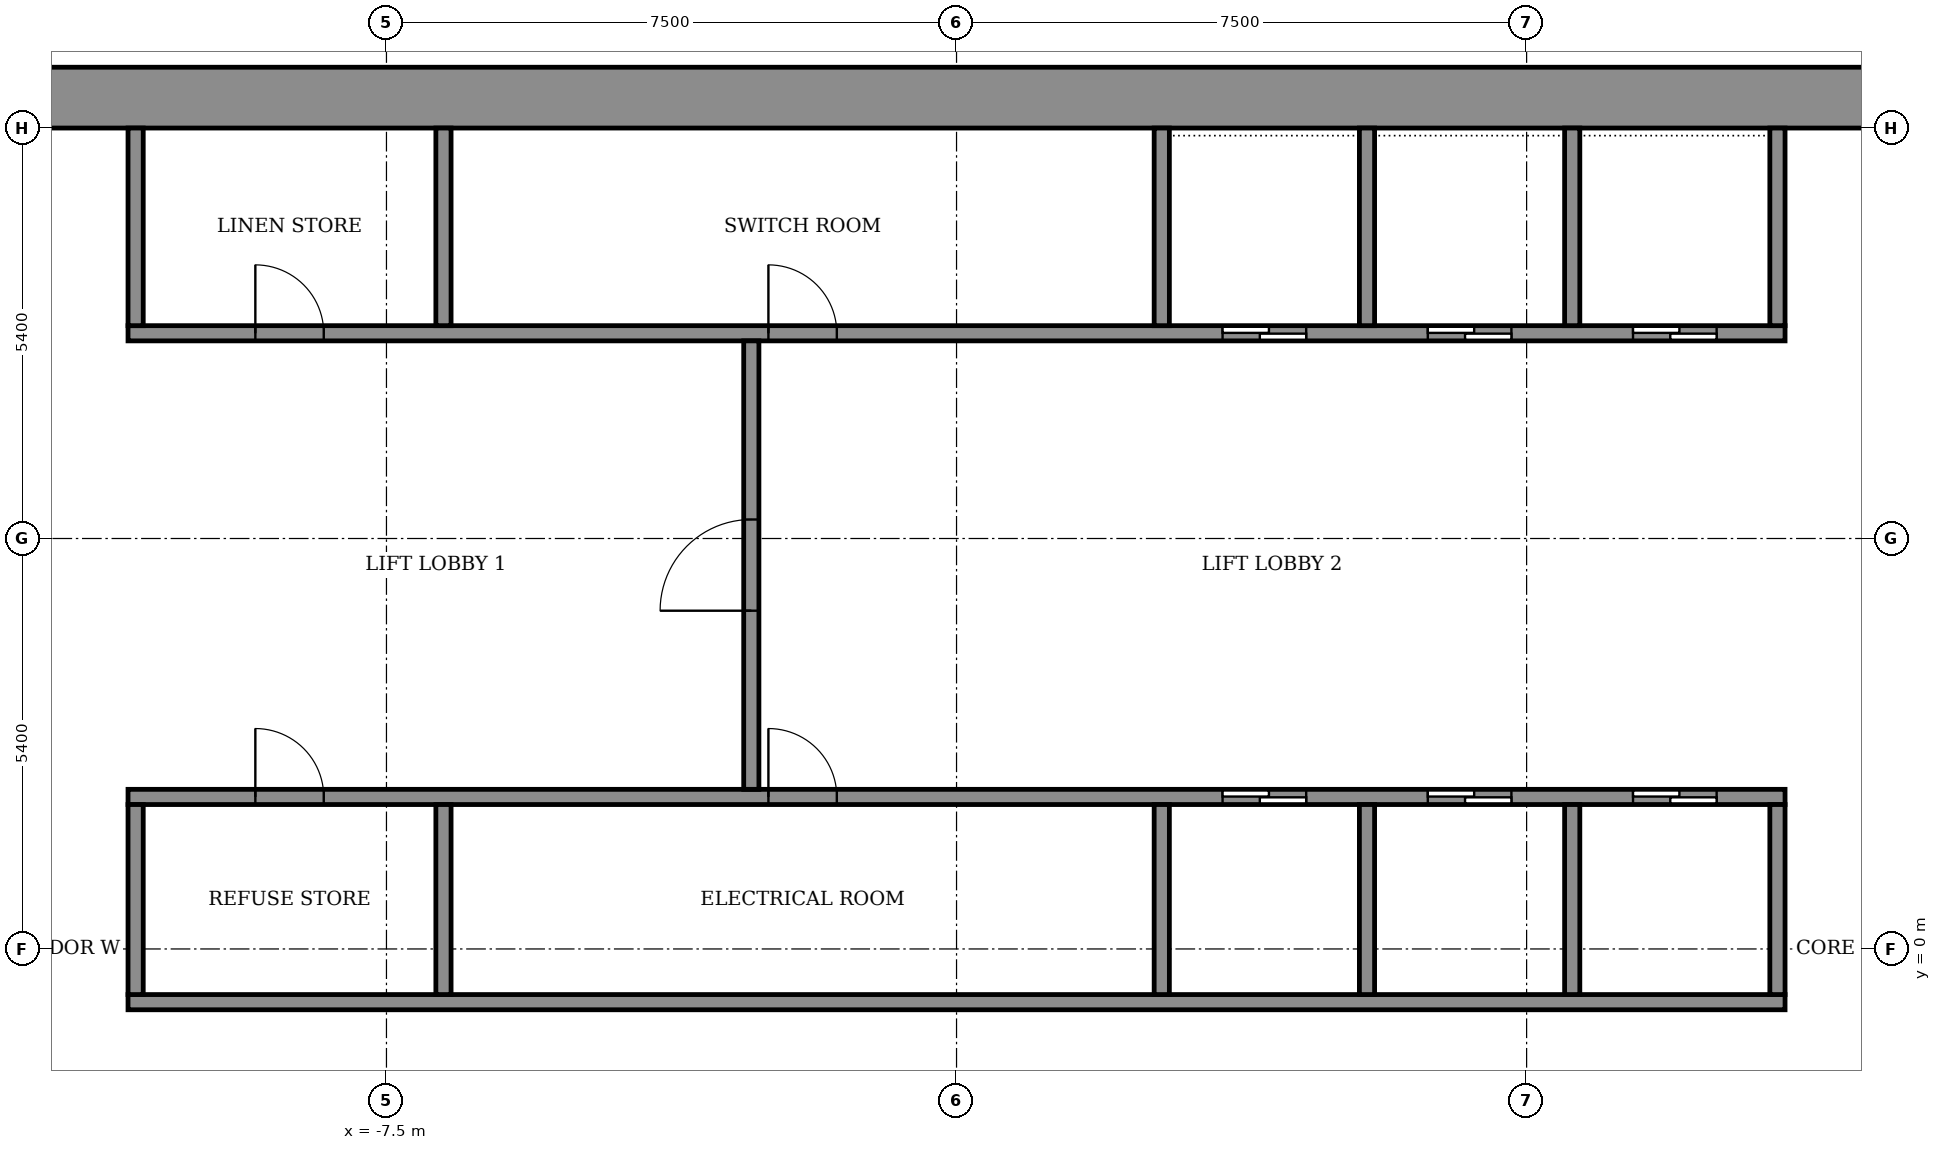
"""IFC4 building model, lengths in metres.
Left out: names, types, materials, properties, quantities, classifications, styles, units other than length and angle.
Written with IfcOpenShell. Run it as: python <this file> out.ifc"""

import sys

from ifc_helpers import new_model, si_unit, direction, frame, frame_2d, origin, place, context, subcontext, project, spatial, rectangle, extrude, element, fill, save


model = new_model("IFC4")
c1 = context("Model", 3, precision=1e-05, world=origin(), true_north=direction((0.0, 1.0)))
c2 = subcontext(c1, "Body", "Model", "MODEL_VIEW")
j1 = project(units=[si_unit("LENGTHUNIT", "METRE"), si_unit("PLANEANGLEUNIT", "RADIAN")], contexts=[c1])
p1 = place(None, origin())
s1 = spatial("IfcSite", under=j1, at=p1, CompositionType="ELEMENT")
p2 = place(p1, origin())
s2 = spatial("IfcBuilding", under=s1, at=p2, CompositionType="ELEMENT")
p3 = place(p2, frame((0.0, 0.0, 201.5)))
s3 = spatial("IfcBuildingStorey", under=s2, at=p3, CompositionType="ELEMENT", Elevation=201.5)
p4 = place(p3, frame((-14.6, 11.2, 0.0), z_axis=(0.0, 0.0, 1.0), x_axis=(1.0, 0.0, 0.0)))
e1 = element("IfcWall", 1, at=p4, inside=s3, PredefinedType="SHEAR", context=c2, shape_type="SweptSolid", body=[
    extrude(rectangle(XDim=29.2, YDim=0.8, at=frame_2d((14.6, 0.0))), origin(), (0.0, 0.0, 1.0), 3.6),
])
p5 = place(p3, frame((-10.9, -0.7, 0.0), z_axis=(0.0, 0.0, 1.0), x_axis=(1.0, 0.0, 0.0)))
e2 = element("IfcWall", 2, at=p5, inside=s3, PredefinedType="SHEAR", context=c2, shape_type="SweptSolid", body=[
    extrude(rectangle(XDim=21.8, YDim=0.2, at=frame_2d((10.9, 0.0))), origin(), (0.0, 0.0, 1.0), 3.05),
])
p6 = place(p3, frame((-10.9, 2.0, 0.0), z_axis=(0.0, 0.0, 1.0), x_axis=(1.0, 0.0, 0.0)))
e3 = element("IfcWall", 3, at=p6, inside=s3, PredefinedType="SHEAR", context=c2, shape_type="SweptSolid", body=[
    extrude(rectangle(XDim=21.8, YDim=0.2, at=frame_2d((10.9, 0.0))), origin(), (0.0, 0.0, 1.0), 3.05),
])
p7 = place(p6, frame((14.4, 0.0, 0.0)))
e4 = element("IfcOpeningElement", 4, at=p7, cuts=e3, PredefinedType="OPENING", context=c2, shape_type="SweptSolid", body=[
    extrude(rectangle(XDim=1.1, YDim=2.1, at=frame_2d((0.55, 1.05))), frame((0.0, 0.11, 0.0), z_axis=(0.0, -1.0, 0.0), x_axis=(1.0, 0.0, 0.0)), (0.0, 0.0, 1.0), 0.22),
])
p8 = place(p6, frame((17.1, 0.0, 0.0)))
e5 = element("IfcOpeningElement", 5, at=p8, cuts=e3, PredefinedType="OPENING", context=c2, shape_type="SweptSolid", body=[
    extrude(rectangle(XDim=1.1, YDim=2.1, at=frame_2d((0.55, 1.05))), frame((0.0, 0.11, 0.0), z_axis=(0.0, -1.0, 0.0), x_axis=(1.0, 0.0, 0.0)), (0.0, 0.0, 1.0), 0.22),
])
p9 = place(p6, frame((19.8, 0.0, 0.0)))
e6 = element("IfcOpeningElement", 6, at=p9, cuts=e3, PredefinedType="OPENING", context=c2, shape_type="SweptSolid", body=[
    extrude(rectangle(XDim=1.1, YDim=2.1, at=frame_2d((0.55, 1.05))), frame((0.0, 0.11, 0.0), z_axis=(0.0, -1.0, 0.0), x_axis=(1.0, 0.0, 0.0)), (0.0, 0.0, 1.0), 0.22),
])
p10 = place(p6, frame((1.675, 0.0, 0.0)))
e7 = element("IfcOpeningElement", 7, at=p10, cuts=e3, PredefinedType="OPENING", context=c2, shape_type="SweptSolid", body=[
    extrude(rectangle(XDim=0.9, YDim=2.1, at=frame_2d((0.45, 1.05))), frame((0.0, 0.11, 0.0), z_axis=(0.0, -1.0, 0.0), x_axis=(1.0, 0.0, 0.0)), (0.0, 0.0, 1.0), 0.22),
])
p11 = place(p6, frame((8.425, 0.0, 0.0)))
e8 = element("IfcOpeningElement", 8, at=p11, cuts=e3, PredefinedType="OPENING", context=c2, shape_type="SweptSolid", body=[
    extrude(rectangle(XDim=0.9, YDim=2.1, at=frame_2d((0.45, 1.05))), frame((0.0, 0.11, 0.0), z_axis=(0.0, -1.0, 0.0), x_axis=(1.0, 0.0, 0.0)), (0.0, 0.0, 1.0), 0.22),
])
p12 = place(p3, frame((-10.9, 8.1, 0.0), z_axis=(0.0, 0.0, 1.0), x_axis=(1.0, 0.0, 0.0)))
e9 = element("IfcWall", 9, at=p12, inside=s3, PredefinedType="SHEAR", context=c2, shape_type="SweptSolid", body=[
    extrude(rectangle(XDim=21.8, YDim=0.2, at=frame_2d((10.9, 0.0))), origin(), (0.0, 0.0, 1.0), 3.05),
])
p13 = place(p12, frame((14.4, 0.0, 0.0)))
e10 = element("IfcOpeningElement", 10, at=p13, cuts=e9, PredefinedType="OPENING", context=c2, shape_type="SweptSolid", body=[
    extrude(rectangle(XDim=1.1, YDim=2.1, at=frame_2d((0.55, 1.05))), frame((0.0, 0.11, 0.0), z_axis=(0.0, -1.0, 0.0), x_axis=(1.0, 0.0, 0.0)), (0.0, 0.0, 1.0), 0.22),
])
p14 = place(p12, frame((17.1, 0.0, 0.0)))
e11 = element("IfcOpeningElement", 11, at=p14, cuts=e9, PredefinedType="OPENING", context=c2, shape_type="SweptSolid", body=[
    extrude(rectangle(XDim=1.1, YDim=2.1, at=frame_2d((0.55, 1.05))), frame((0.0, 0.11, 0.0), z_axis=(0.0, -1.0, 0.0), x_axis=(1.0, 0.0, 0.0)), (0.0, 0.0, 1.0), 0.22),
])
p15 = place(p12, frame((19.8, 0.0, 0.0)))
e12 = element("IfcOpeningElement", 12, at=p15, cuts=e9, PredefinedType="OPENING", context=c2, shape_type="SweptSolid", body=[
    extrude(rectangle(XDim=1.1, YDim=2.1, at=frame_2d((0.55, 1.05))), frame((0.0, 0.11, 0.0), z_axis=(0.0, -1.0, 0.0), x_axis=(1.0, 0.0, 0.0)), (0.0, 0.0, 1.0), 0.22),
])
p16 = place(p12, frame((1.675, 0.0, 0.0)))
e13 = element("IfcOpeningElement", 13, at=p16, cuts=e9, PredefinedType="OPENING", context=c2, shape_type="SweptSolid", body=[
    extrude(rectangle(XDim=0.9, YDim=2.1, at=frame_2d((0.45, 1.05))), frame((0.0, 0.11, 0.0), z_axis=(0.0, -1.0, 0.0), x_axis=(1.0, 0.0, 0.0)), (0.0, 0.0, 1.0), 0.22),
])
p17 = place(p12, frame((8.425, 0.0, 0.0)))
e14 = element("IfcOpeningElement", 14, at=p17, cuts=e9, PredefinedType="OPENING", context=c2, shape_type="SweptSolid", body=[
    extrude(rectangle(XDim=0.9, YDim=2.1, at=frame_2d((0.45, 1.05))), frame((0.0, 0.11, 0.0), z_axis=(0.0, -1.0, 0.0), x_axis=(1.0, 0.0, 0.0)), (0.0, 0.0, 1.0), 0.22),
])
for number, where, z_axis, x_axis in (
    (15, (-10.8, -0.6, 0.0), (0.0, 0.0, 1.0), (0.0, 1.0, 0.0)),
    (16, (-6.75, -0.6, 0.0), (0.0, 0.0, 1.0), (0.0, 1.0, 0.0)),
):
    element("IfcWall", number, at=place(p3, frame(where, z_axis=z_axis, x_axis=x_axis)), inside=s3, PredefinedType="STANDARD", context=c2, shape_type="SweptSolid", body=[
        extrude(rectangle(XDim=2.5, YDim=0.2, at=frame_2d((1.25, 0.0))), origin(), (0.0, 0.0, 1.0), 3.05),
    ])
for number, where, z_axis, x_axis in (
    (17, (2.7, -0.6, 0.0), (0.0, 0.0, 1.0), (0.0, 1.0, 0.0)),
    (18, (5.4, -0.6, 0.0), (0.0, 0.0, 1.0), (0.0, 1.0, 0.0)),
    (19, (8.1, -0.6, 0.0), (0.0, 0.0, 1.0), (0.0, 1.0, 0.0)),
    (20, (10.8, -0.6, 0.0), (0.0, 0.0, 1.0), (0.0, 1.0, 0.0)),
):
    element("IfcWall", number, at=place(p3, frame(where, z_axis=z_axis, x_axis=x_axis)), inside=s3, PredefinedType="SHEAR", context=c2, shape_type="SweptSolid", body=[
        extrude(rectangle(XDim=2.5, YDim=0.2, at=frame_2d((1.25, 0.0))), origin(), (0.0, 0.0, 1.0), 3.05),
    ])
for number, where, z_axis, x_axis in (
    (21, (-10.8, 8.2, 0.0), (0.0, 0.0, 1.0), (0.0, 1.0, 0.0)),
    (22, (-6.75, 8.2, 0.0), (0.0, 0.0, 1.0), (0.0, 1.0, 0.0)),
):
    element("IfcWall", number, at=place(p3, frame(where, z_axis=z_axis, x_axis=x_axis)), inside=s3, PredefinedType="STANDARD", context=c2, shape_type="SweptSolid", body=[
        extrude(rectangle(XDim=2.6, YDim=0.2, at=frame_2d((1.3, 0.0))), origin(), (0.0, 0.0, 1.0), 3.05),
    ])
for number, where, z_axis, x_axis in (
    (23, (2.7, 8.2, 0.0), (0.0, 0.0, 1.0), (0.0, 1.0, 0.0)),
    (24, (5.4, 8.2, 0.0), (0.0, 0.0, 1.0), (0.0, 1.0, 0.0)),
    (25, (8.1, 8.2, 0.0), (0.0, 0.0, 1.0), (0.0, 1.0, 0.0)),
    (26, (10.8, 8.2, 0.0), (0.0, 0.0, 1.0), (0.0, 1.0, 0.0)),
):
    element("IfcWall", number, at=place(p3, frame(where, z_axis=z_axis, x_axis=x_axis)), inside=s3, PredefinedType="SHEAR", context=c2, shape_type="SweptSolid", body=[
        extrude(rectangle(XDim=2.6, YDim=0.2, at=frame_2d((1.3, 0.0))), origin(), (0.0, 0.0, 1.0), 3.05),
    ])
p18 = place(p3, frame((-2.7, 2.1, 0.0), z_axis=(0.0, 0.0, 1.0), x_axis=(0.0, 1.0, 0.0)))
e27 = element("IfcWall", 27, at=p18, inside=s3, PredefinedType="STANDARD", context=c2, shape_type="SweptSolid", body=[
    extrude(rectangle(XDim=5.9, YDim=0.2, at=frame_2d((2.95, 0.0))), origin(), (0.0, 0.0, 1.0), 3.05),
])
p19 = place(p18, frame((2.35, 0.0, 0.0)))
e28 = element("IfcOpeningElement", 28, at=p19, cuts=e27, PredefinedType="OPENING", context=c2, shape_type="SweptSolid", body=[
    extrude(rectangle(XDim=1.2, YDim=2.1, at=frame_2d((0.6, 1.05))), frame((0.0, 0.11, 0.0), z_axis=(0.0, -1.0, 0.0), x_axis=(1.0, 0.0, 0.0)), (0.0, 0.0, 1.0), 0.22),
])
p20 = place(p7, origin())
e29 = element("IfcDoor", 29, at=p20, inside=s3, OperationType="SLIDING_TO_LEFT", PredefinedType="DOOR", context=c2, shape_type="SweptSolid", body=[
    extrude(rectangle(XDim=1.1, YDim=2.1, at=frame_2d((0.55, 1.05))), frame((0.0, 0.025, 0.0), z_axis=(0.0, -1.0, 0.0), x_axis=(1.0, 0.0, 0.0)), (0.0, 0.0, 1.0), 0.05),
])
fill(e4, e29)
p21 = place(p8, origin())
e30 = element("IfcDoor", 30, at=p21, inside=s3, OperationType="SLIDING_TO_LEFT", PredefinedType="DOOR", context=c2, shape_type="SweptSolid", body=[
    extrude(rectangle(XDim=1.1, YDim=2.1, at=frame_2d((0.55, 1.05))), frame((0.0, 0.025, 0.0), z_axis=(0.0, -1.0, 0.0), x_axis=(1.0, 0.0, 0.0)), (0.0, 0.0, 1.0), 0.05),
])
fill(e5, e30)
p22 = place(p9, origin())
e31 = element("IfcDoor", 31, at=p22, inside=s3, OperationType="SLIDING_TO_LEFT", PredefinedType="DOOR", context=c2, shape_type="SweptSolid", body=[
    extrude(rectangle(XDim=1.1, YDim=2.1, at=frame_2d((0.55, 1.05))), frame((0.0, 0.025, 0.0), z_axis=(0.0, -1.0, 0.0), x_axis=(1.0, 0.0, 0.0)), (0.0, 0.0, 1.0), 0.05),
])
fill(e6, e31)
p23 = place(p13, origin())
e32 = element("IfcDoor", 32, at=p23, inside=s3, OperationType="SLIDING_TO_LEFT", PredefinedType="DOOR", context=c2, shape_type="SweptSolid", body=[
    extrude(rectangle(XDim=1.1, YDim=2.1, at=frame_2d((0.55, 1.05))), frame((0.0, 0.025, 0.0), z_axis=(0.0, -1.0, 0.0), x_axis=(1.0, 0.0, 0.0)), (0.0, 0.0, 1.0), 0.05),
])
fill(e10, e32)
p24 = place(p14, origin())
e33 = element("IfcDoor", 33, at=p24, inside=s3, OperationType="SLIDING_TO_LEFT", PredefinedType="DOOR", context=c2, shape_type="SweptSolid", body=[
    extrude(rectangle(XDim=1.1, YDim=2.1, at=frame_2d((0.55, 1.05))), frame((0.0, 0.025, 0.0), z_axis=(0.0, -1.0, 0.0), x_axis=(1.0, 0.0, 0.0)), (0.0, 0.0, 1.0), 0.05),
])
fill(e11, e33)
p25 = place(p15, origin())
e34 = element("IfcDoor", 34, at=p25, inside=s3, OperationType="SLIDING_TO_LEFT", PredefinedType="DOOR", context=c2, shape_type="SweptSolid", body=[
    extrude(rectangle(XDim=1.1, YDim=2.1, at=frame_2d((0.55, 1.05))), frame((0.0, 0.025, 0.0), z_axis=(0.0, -1.0, 0.0), x_axis=(1.0, 0.0, 0.0)), (0.0, 0.0, 1.0), 0.05),
])
fill(e12, e34)
p26 = place(p10, origin())
e35 = element("IfcDoor", 35, at=p26, inside=s3, OperationType="SINGLE_SWING_RIGHT", PredefinedType="DOOR", context=c2, shape_type="SweptSolid", body=[
    extrude(rectangle(XDim=0.9, YDim=2.1, at=frame_2d((0.45, 1.05))), frame((0.0, 0.025, 0.0), z_axis=(0.0, -1.0, 0.0), x_axis=(1.0, 0.0, 0.0)), (0.0, 0.0, 1.0), 0.05),
])
fill(e7, e35)
p27 = place(p11, origin())
e36 = element("IfcDoor", 36, at=p27, inside=s3, OperationType="SINGLE_SWING_LEFT", PredefinedType="DOOR", context=c2, shape_type="SweptSolid", body=[
    extrude(rectangle(XDim=0.9, YDim=2.1, at=frame_2d((0.45, 1.05))), frame((0.0, 0.025, 0.0), z_axis=(0.0, -1.0, 0.0), x_axis=(1.0, 0.0, 0.0)), (0.0, 0.0, 1.0), 0.05),
])
fill(e8, e36)
p28 = place(p16, origin())
e37 = element("IfcDoor", 37, at=p28, inside=s3, OperationType="SINGLE_SWING_RIGHT", PredefinedType="DOOR", context=c2, shape_type="SweptSolid", body=[
    extrude(rectangle(XDim=0.9, YDim=2.1, at=frame_2d((0.45, 1.05))), frame((0.0, 0.025, 0.0), z_axis=(0.0, -1.0, 0.0), x_axis=(1.0, 0.0, 0.0)), (0.0, 0.0, 1.0), 0.05),
])
fill(e13, e37)
p29 = place(p17, origin())
e38 = element("IfcDoor", 38, at=p29, inside=s3, OperationType="SINGLE_SWING_LEFT", PredefinedType="DOOR", context=c2, shape_type="SweptSolid", body=[
    extrude(rectangle(XDim=0.9, YDim=2.1, at=frame_2d((0.45, 1.05))), frame((0.0, 0.025, 0.0), z_axis=(0.0, -1.0, 0.0), x_axis=(1.0, 0.0, 0.0)), (0.0, 0.0, 1.0), 0.05),
])
fill(e14, e38)
p30 = place(p19, origin())
e39 = element("IfcDoor", 39, at=p30, inside=s3, OperationType="SINGLE_SWING_LEFT", PredefinedType="DOOR", context=c2, shape_type="SweptSolid", body=[
    extrude(rectangle(XDim=1.2, YDim=2.1, at=frame_2d((0.6, 1.05))), frame((0.0, 0.025, 0.0), z_axis=(0.0, -1.0, 0.0), x_axis=(1.0, 0.0, 0.0)), (0.0, 0.0, 1.0), 0.05),
])
fill(e28, e39)
save(model, sys.argv[1])
